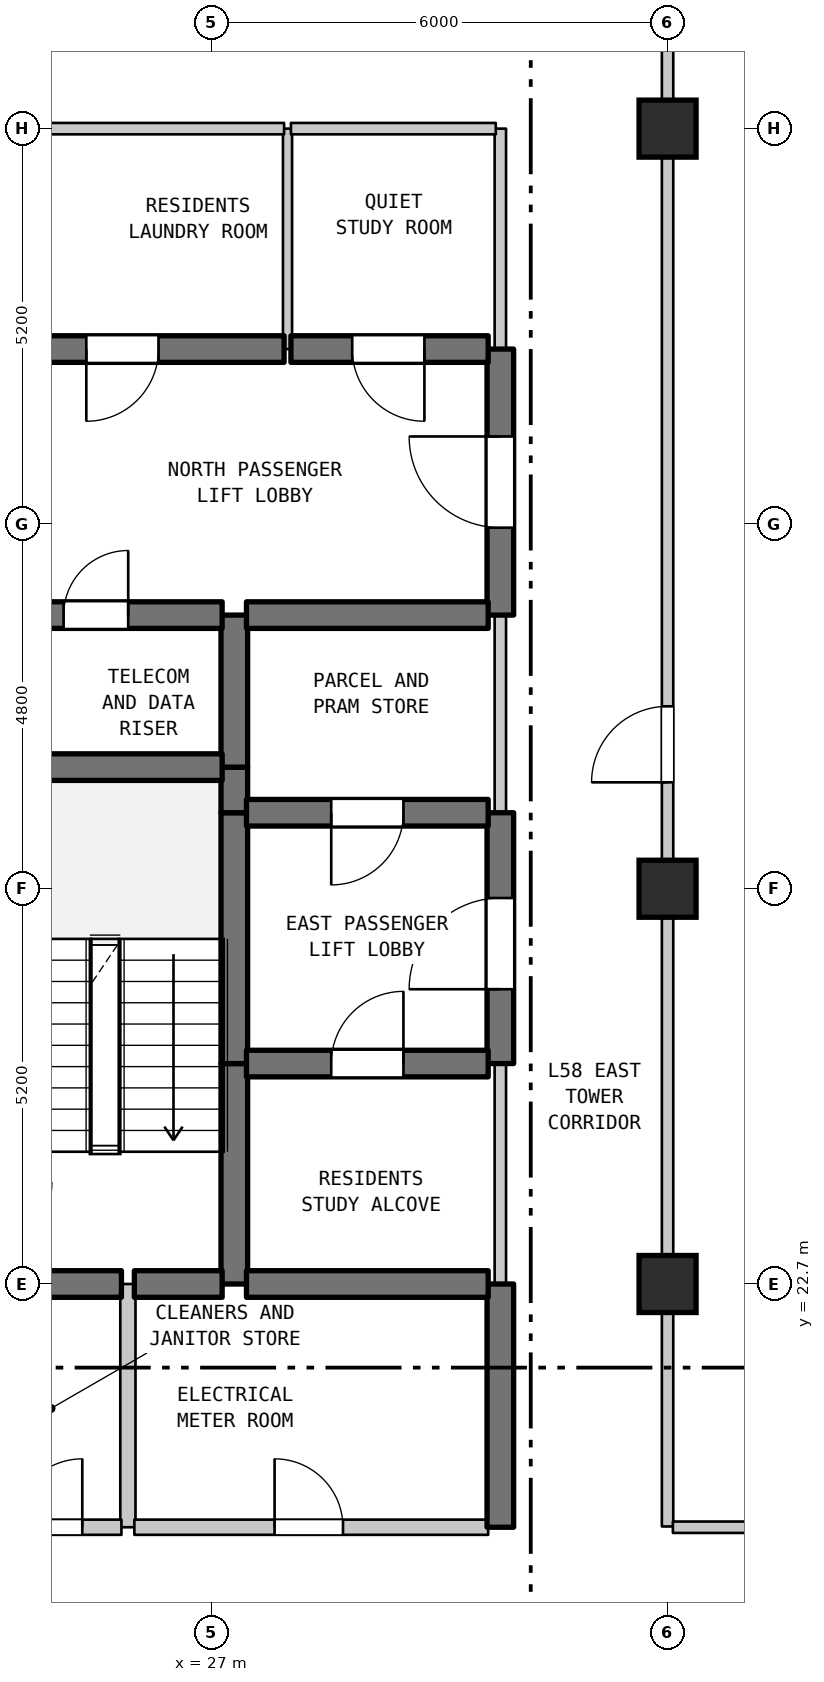
"""IFC4 building model, lengths in metres.
Left out: names, types, materials, properties, quantities, classifications, styles, units other than length and angle.
Written with IfcOpenShell. Run it as: python <this file> out.ifc"""

import sys

from ifc_helpers import new_model, si_unit, direction, frame, frame_2d, origin, origin_2d, place, context, subcontext, project, spatial, rectangle, extrude, element, fill, save


model = new_model("IFC4")
c1 = context("Model", 3, precision=1e-05, world=origin(), true_north=direction((0.0, 1.0)))
c2 = subcontext(c1, "Body", "Model", "MODEL_VIEW")
j1 = project(units=[si_unit("LENGTHUNIT", "METRE"), si_unit("PLANEANGLEUNIT", "RADIAN")], contexts=[c1])
p1 = place(None, origin())
s1 = spatial("IfcSite", under=j1, at=p1, CompositionType="ELEMENT")
p2 = place(p1, origin())
s2 = spatial("IfcBuilding", under=s1, at=p2, CompositionType="ELEMENT")
p3 = place(p2, frame((0.0, 0.0, 233.9)))
s3 = spatial("IfcBuildingStorey", under=s2, at=p3, CompositionType="ELEMENT", Elevation=233.9)
for number, where, z_axis, x_axis in (
    (1, (33.0, 22.7, 0.0), (0.0, 0.0, 1.0), (1.0, 0.0, 0.0)),
    (2, (33.0, 27.9, 0.0), (0.0, 0.0, 1.0), (1.0, 0.0, 0.0)),
    (3, (33.0, 37.9, 0.0), (0.0, 0.0, 1.0), (1.0, 0.0, 0.0)),
):
    element("IfcColumn", number, at=place(p3, frame(where, z_axis=z_axis, x_axis=x_axis)), inside=s3, PredefinedType="COLUMN", context=c2, shape_type="SweptSolid", body=[
        extrude(rectangle(XDim=0.75, YDim=0.75, at=origin_2d()), origin(), (0.0, 0.0, 1.0), 3.7),
    ])
p4 = place(p3, frame((25.9, 19.5, 0.0), z_axis=(0.0, 0.0, 1.0), x_axis=(0.0, 1.0, 0.0)))
e4 = element("IfcWall", 4, at=p4, inside=s3, PredefinedType="STANDARD", context=c2, shape_type="SweptSolid", body=[
    extrude(rectangle(XDim=3.2, YDim=0.2, at=frame_2d((1.6, 0.0))), origin(), (0.0, 0.0, 1.0), 3.28),
])
p5 = place(p3, frame((27.3, 22.7, 0.0), z_axis=(0.0, 0.0, 1.0), x_axis=(0.0, 1.0, 0.0)))
e5 = element("IfcWall", 5, at=p5, inside=s3, PredefinedType="SHEAR", context=c2, shape_type="SweptSolid", body=[
    extrude(rectangle(XDim=2.9, YDim=0.35, at=frame_2d((1.45, 0.0))), origin(), (0.0, 0.0, 1.0), 3.28),
])
p6 = place(p3, frame((27.3, 25.6, 0.0), z_axis=(0.0, 0.0, 1.0), x_axis=(0.0, 1.0, 0.0)))
e6 = element("IfcWall", 6, at=p6, inside=s3, PredefinedType="SHEAR", context=c2, shape_type="SweptSolid", body=[
    extrude(rectangle(XDim=3.3, YDim=0.35, at=frame_2d((1.65, 0.0))), origin(), (0.0, 0.0, 1.0), 3.28),
])
p7 = place(p3, frame((27.3, 28.9, 0.0), z_axis=(0.0, 0.0, 1.0), x_axis=(0.0, 1.0, 0.0)))
e7 = element("IfcWall", 7, at=p7, inside=s3, PredefinedType="SHEAR", context=c2, shape_type="SweptSolid", body=[
    extrude(rectangle(XDim=0.6, YDim=0.35, at=frame_2d((0.3, 0.0))), origin(), (0.0, 0.0, 1.0), 3.28),
])
p8 = place(p3, frame((27.3, 29.5, 0.0), z_axis=(0.0, 0.0, 1.0), x_axis=(0.0, 1.0, 0.0)))
e8 = element("IfcWall", 8, at=p8, inside=s3, PredefinedType="SHEAR", context=c2, shape_type="SweptSolid", body=[
    extrude(rectangle(XDim=2.0, YDim=0.35, at=frame_2d((1.0, 0.0))), origin(), (0.0, 0.0, 1.0), 3.28),
])
p9 = place(p3, frame((28.0, 35.0, 0.0), z_axis=(0.0, 0.0, 1.0), x_axis=(0.0, 1.0, 0.0)))
e9 = element("IfcWall", 9, at=p9, inside=s3, PredefinedType="PARTITIONING", context=c2, shape_type="SweptSolid", body=[
    extrude(rectangle(XDim=2.9, YDim=0.12, at=frame_2d((1.45, 0.0))), origin(), (0.0, 0.0, 1.0), 3.28),
])
p10 = place(p3, frame((30.8, 19.5, 0.0), z_axis=(0.0, 0.0, 1.0), x_axis=(0.0, 1.0, 0.0)))
e10 = element("IfcWall", 10, at=p10, inside=s3, PredefinedType="SHEAR", context=c2, shape_type="SweptSolid", body=[
    extrude(rectangle(XDim=3.2, YDim=0.35, at=frame_2d((1.6, 0.0))), origin(), (0.0, 0.0, 1.0), 3.28),
])
p11 = place(p3, frame((30.8, 22.7, 0.0), z_axis=(0.0, 0.0, 1.0), x_axis=(0.0, 1.0, 0.0)))
e11 = element("IfcWall", 11, at=p11, inside=s3, PredefinedType="STANDARD", context=c2, shape_type="SweptSolid", body=[
    extrude(rectangle(XDim=2.9, YDim=0.15, at=frame_2d((1.45, 0.0))), origin(), (0.0, 0.0, 1.0), 3.28),
])
p12 = place(p3, frame((30.8, 25.6, 0.0), z_axis=(0.0, 0.0, 1.0), x_axis=(0.0, 1.0, 0.0)))
e12 = element("IfcWall", 12, at=p12, inside=s3, PredefinedType="SHEAR", context=c2, shape_type="SweptSolid", body=[
    extrude(rectangle(XDim=3.3, YDim=0.35, at=frame_2d((1.65, 0.0))), origin(), (0.0, 0.0, 1.0), 3.28),
])
p13 = place(p12, frame((0.978, 0.0, 0.0)))
e13 = element("IfcOpeningElement", 13, at=p13, cuts=e12, PredefinedType="OPENING", context=c2, shape_type="SweptSolid", body=[
    extrude(rectangle(XDim=1.2, YDim=2.2, at=frame_2d((0.6, 1.1))), frame((0.0, 0.185, 0.0), z_axis=(0.0, -1.0, 0.0), x_axis=(1.0, 0.0, 0.0)), (0.0, 0.0, 1.0), 0.37),
])
p14 = place(p3, frame((30.8, 28.9, 0.0), z_axis=(0.0, 0.0, 1.0), x_axis=(0.0, 1.0, 0.0)))
e14 = element("IfcWall", 14, at=p14, inside=s3, PredefinedType="STANDARD", context=c2, shape_type="SweptSolid", body=[
    extrude(rectangle(XDim=2.6, YDim=0.15, at=frame_2d((1.3, 0.0))), origin(), (0.0, 0.0, 1.0), 3.28),
])
p15 = place(p3, frame((30.8, 31.5, 0.0), z_axis=(0.0, 0.0, 1.0), x_axis=(0.0, 1.0, 0.0)))
e15 = element("IfcWall", 15, at=p15, inside=s3, PredefinedType="SHEAR", context=c2, shape_type="SweptSolid", body=[
    extrude(rectangle(XDim=3.5, YDim=0.35, at=frame_2d((1.75, 0.0))), origin(), (0.0, 0.0, 1.0), 3.28),
])
p16 = place(p15, frame((1.15, 0.0, 0.0)))
e16 = element("IfcOpeningElement", 16, at=p16, cuts=e15, PredefinedType="OPENING", context=c2, shape_type="SweptSolid", body=[
    extrude(rectangle(XDim=1.2, YDim=2.2, at=frame_2d((0.6, 1.1))), frame((0.0, 0.185, 0.0), z_axis=(0.0, -1.0, 0.0), x_axis=(1.0, 0.0, 0.0)), (0.0, 0.0, 1.0), 0.37),
])
p17 = place(p3, frame((30.8, 35.0, 0.0), z_axis=(0.0, 0.0, 1.0), x_axis=(0.0, 1.0, 0.0)))
e17 = element("IfcWall", 17, at=p17, inside=s3, PredefinedType="STANDARD", context=c2, shape_type="SweptSolid", body=[
    extrude(rectangle(XDim=2.9, YDim=0.15, at=frame_2d((1.45, 0.0))), origin(), (0.0, 0.0, 1.0), 3.28),
])
p18 = place(p3, frame((33.0, 19.51, 0.0), z_axis=(0.0, 0.0, 1.0), x_axis=(0.0, 1.0, 0.0)))
e18 = element("IfcWall", 18, at=p18, inside=s3, PredefinedType="STANDARD", context=c2, shape_type="SweptSolid", body=[
    extrude(rectangle(XDim=18.39, YDim=0.15, at=frame_2d((9.195, 0.0))), origin(), (0.0, 0.0, 1.0), 2.78),
])
p19 = place(p18, frame((9.79, 0.0, 0.0)))
e19 = element("IfcOpeningElement", 19, at=p19, cuts=e18, PredefinedType="OPENING", context=c2, shape_type="SweptSolid", body=[
    extrude(rectangle(XDim=1.0, YDim=2.15, at=frame_2d((0.5, 1.075))), frame((0.0, 0.085, 0.0), z_axis=(0.0, -1.0, 0.0), x_axis=(1.0, 0.0, 0.0)), (0.0, 0.0, 1.0), 0.17),
])
p20 = place(p3, frame((23.96, 19.5, 0.0), z_axis=(0.0, 0.0, 1.0), x_axis=(1.0, 0.0, 0.0)))
e20 = element("IfcWall", 20, at=p20, inside=s3, PredefinedType="STANDARD", context=c2, shape_type="SweptSolid", body=[
    extrude(rectangle(XDim=1.855, YDim=0.2, at=frame_2d((0.927, 0.0))), origin(), (0.0, 0.0, 1.0), 3.28),
])
p21 = place(p20, frame((0.44, 0.0, 0.0)))
e21 = element("IfcOpeningElement", 21, at=p21, cuts=e20, PredefinedType="OPENING", context=c2, shape_type="SweptSolid", body=[
    extrude(rectangle(XDim=0.9, YDim=2.15, at=frame_2d((0.45, 1.075))), frame((0.0, 0.11, 0.0), z_axis=(0.0, -1.0, 0.0), x_axis=(1.0, 0.0, 0.0)), (0.0, 0.0, 1.0), 0.22),
])
p22 = place(p3, frame((25.985, 19.5, 0.0), z_axis=(0.0, 0.0, 1.0), x_axis=(1.0, 0.0, 0.0)))
e22 = element("IfcWall", 22, at=p22, inside=s3, PredefinedType="STANDARD", context=c2, shape_type="SweptSolid", body=[
    extrude(rectangle(XDim=4.655, YDim=0.2, at=frame_2d((2.327, 0.0))), origin(), (0.0, 0.0, 1.0), 3.28),
])
p23 = place(p22, frame((1.845, 0.0, 0.0)))
e23 = element("IfcOpeningElement", 23, at=p23, cuts=e22, PredefinedType="OPENING", context=c2, shape_type="SweptSolid", body=[
    extrude(rectangle(XDim=0.9, YDim=2.15, at=frame_2d((0.45, 1.075))), frame((0.0, 0.11, 0.0), z_axis=(0.0, -1.0, 0.0), x_axis=(1.0, 0.0, 0.0)), (0.0, 0.0, 1.0), 0.22),
])
p24 = place(p3, frame((33.07, 19.5, 0.0), z_axis=(0.0, 0.0, 1.0), x_axis=(1.0, 0.0, 0.0)))
e24 = element("IfcWall", 24, at=p24, inside=s3, PredefinedType="STANDARD", context=c2, shape_type="SweptSolid", body=[
    extrude(rectangle(XDim=18.87, YDim=0.15, at=frame_2d((9.435, 0.0))), origin(), (0.0, 0.0, 1.0), 3.28),
])
p25 = place(p24, frame((8.935, 0.0, 0.0)))
e25 = element("IfcOpeningElement", 25, at=p25, cuts=e24, PredefinedType="OPENING", context=c2, shape_type="SweptSolid", body=[
    extrude(rectangle(XDim=1.0, YDim=2.15, at=frame_2d((0.5, 1.075))), frame((0.0, 0.085, 0.0), z_axis=(0.0, -1.0, 0.0), x_axis=(1.0, 0.0, 0.0)), (0.0, 0.0, 1.0), 0.17),
])
p26 = place(p3, frame((23.96, 22.7, 0.0), z_axis=(0.0, 0.0, 1.0), x_axis=(1.0, 0.0, 0.0)))
e26 = element("IfcWall", 26, at=p26, inside=s3, PredefinedType="SHEAR", context=c2, shape_type="SweptSolid", body=[
    extrude(rectangle(XDim=1.855, YDim=0.35, at=frame_2d((0.927, 0.0))), origin(), (0.0, 0.0, 1.0), 3.28),
])
p27 = place(p3, frame((25.985, 22.7, 0.0), z_axis=(0.0, 0.0, 1.0), x_axis=(1.0, 0.0, 0.0)))
e27 = element("IfcWall", 27, at=p27, inside=s3, PredefinedType="SHEAR", context=c2, shape_type="SweptSolid", body=[
    extrude(rectangle(XDim=1.155, YDim=0.35, at=frame_2d((0.577, 0.0))), origin(), (0.0, 0.0, 1.0), 3.28),
])
p28 = place(p3, frame((27.46, 22.7, 0.0), z_axis=(0.0, 0.0, 1.0), x_axis=(1.0, 0.0, 0.0)))
e28 = element("IfcWall", 28, at=p28, inside=s3, PredefinedType="SHEAR", context=c2, shape_type="SweptSolid", body=[
    extrude(rectangle(XDim=3.18, YDim=0.35, at=frame_2d((1.59, 0.0))), origin(), (0.0, 0.0, 1.0), 3.28),
])
p29 = place(p3, frame((27.46, 25.6, 0.0), z_axis=(0.0, 0.0, 1.0), x_axis=(1.0, 0.0, 0.0)))
e29 = element("IfcWall", 29, at=p29, inside=s3, PredefinedType="SHEAR", context=c2, shape_type="SweptSolid", body=[
    extrude(rectangle(XDim=3.18, YDim=0.35, at=frame_2d((1.59, 0.0))), origin(), (0.0, 0.0, 1.0), 3.28),
])
p30 = place(p29, frame((1.115, 0.0, 0.0)))
e30 = element("IfcOpeningElement", 30, at=p30, cuts=e29, PredefinedType="OPENING", context=c2, shape_type="SweptSolid", body=[
    extrude(rectangle(XDim=0.95, YDim=2.15, at=frame_2d((0.475, 1.075))), frame((0.0, 0.185, 0.0), z_axis=(0.0, -1.0, 0.0), x_axis=(1.0, 0.0, 0.0)), (0.0, 0.0, 1.0), 0.37),
])
p31 = place(p3, frame((27.46, 28.9, 0.0), z_axis=(0.0, 0.0, 1.0), x_axis=(1.0, 0.0, 0.0)))
e31 = element("IfcWall", 31, at=p31, inside=s3, PredefinedType="SHEAR", context=c2, shape_type="SweptSolid", body=[
    extrude(rectangle(XDim=3.18, YDim=0.35, at=frame_2d((1.59, 0.0))), origin(), (0.0, 0.0, 1.0), 3.28),
])
p32 = place(p31, frame((1.115, 0.0, 0.0)))
e32 = element("IfcOpeningElement", 32, at=p32, cuts=e31, PredefinedType="OPENING", context=c2, shape_type="SweptSolid", body=[
    extrude(rectangle(XDim=0.95, YDim=2.15, at=frame_2d((0.475, 1.075))), frame((0.0, 0.185, 0.0), z_axis=(0.0, -1.0, 0.0), x_axis=(1.0, 0.0, 0.0)), (0.0, 0.0, 1.0), 0.37),
])
p33 = place(p3, frame((23.96, 29.5, 0.0), z_axis=(0.0, 0.0, 1.0), x_axis=(1.0, 0.0, 0.0)))
e33 = element("IfcWall", 33, at=p33, inside=s3, PredefinedType="SHEAR", context=c2, shape_type="SweptSolid", body=[
    extrude(rectangle(XDim=3.18, YDim=0.35, at=frame_2d((1.59, 0.0))), origin(), (0.0, 0.0, 1.0), 3.28),
])
p34 = place(p3, frame((23.96, 31.5, 0.0), z_axis=(0.0, 0.0, 1.0), x_axis=(1.0, 0.0, 0.0)))
e34 = element("IfcWall", 34, at=p34, inside=s3, PredefinedType="SHEAR", context=c2, shape_type="SweptSolid", body=[
    extrude(rectangle(XDim=3.18, YDim=0.35, at=frame_2d((1.59, 0.0))), origin(), (0.0, 0.0, 1.0), 3.28),
])
p35 = place(p34, frame((1.094, 0.0, 0.0)))
e35 = element("IfcOpeningElement", 35, at=p35, cuts=e34, PredefinedType="OPENING", context=c2, shape_type="SweptSolid", body=[
    extrude(rectangle(XDim=0.85, YDim=2.1, at=frame_2d((0.425, 1.05))), frame((0.0, 0.185, 0.0), z_axis=(0.0, -1.0, 0.0), x_axis=(1.0, 0.0, 0.0)), (0.0, 0.0, 1.0), 0.37),
])
p36 = place(p3, frame((27.46, 31.5, 0.0), z_axis=(0.0, 0.0, 1.0), x_axis=(1.0, 0.0, 0.0)))
e36 = element("IfcWall", 36, at=p36, inside=s3, PredefinedType="SHEAR", context=c2, shape_type="SweptSolid", body=[
    extrude(rectangle(XDim=3.18, YDim=0.35, at=frame_2d((1.59, 0.0))), origin(), (0.0, 0.0, 1.0), 3.28),
])
p37 = place(p3, frame((23.96, 35.0, 0.0), z_axis=(0.0, 0.0, 1.0), x_axis=(1.0, 0.0, 0.0)))
e37 = element("IfcWall", 37, at=p37, inside=s3, PredefinedType="SHEAR", context=c2, shape_type="SweptSolid", body=[
    extrude(rectangle(XDim=3.995, YDim=0.35, at=frame_2d((1.998, 0.0))), origin(), (0.0, 0.0, 1.0), 3.28),
])
p38 = place(p37, frame((1.393, 0.0, 0.0)))
e38 = element("IfcOpeningElement", 38, at=p38, cuts=e37, PredefinedType="OPENING", context=c2, shape_type="SweptSolid", body=[
    extrude(rectangle(XDim=0.95, YDim=2.15, at=frame_2d((0.475, 1.075))), frame((0.0, 0.185, 0.0), z_axis=(0.0, -1.0, 0.0), x_axis=(1.0, 0.0, 0.0)), (0.0, 0.0, 1.0), 0.37),
])
p39 = place(p3, frame((28.045, 35.0, 0.0), z_axis=(0.0, 0.0, 1.0), x_axis=(1.0, 0.0, 0.0)))
e39 = element("IfcWall", 39, at=p39, inside=s3, PredefinedType="SHEAR", context=c2, shape_type="SweptSolid", body=[
    extrude(rectangle(XDim=2.595, YDim=0.35, at=frame_2d((1.297, 0.0))), origin(), (0.0, 0.0, 1.0), 3.28),
])
p40 = place(p39, frame((0.806, 0.0, 0.0)))
e40 = element("IfcOpeningElement", 40, at=p40, cuts=e39, PredefinedType="OPENING", context=c2, shape_type="SweptSolid", body=[
    extrude(rectangle(XDim=0.95, YDim=2.15, at=frame_2d((0.475, 1.075))), frame((0.0, 0.185, 0.0), z_axis=(0.0, -1.0, 0.0), x_axis=(1.0, 0.0, 0.0)), (0.0, 0.0, 1.0), 0.37),
])
p41 = place(p3, frame((23.96, 37.9, 0.0), z_axis=(0.0, 0.0, 1.0), x_axis=(1.0, 0.0, 0.0)))
e41 = element("IfcWall", 41, at=p41, inside=s3, PredefinedType="STANDARD", context=c2, shape_type="SweptSolid", body=[
    extrude(rectangle(XDim=3.995, YDim=0.15, at=frame_2d((1.998, 0.0))), origin(), (0.0, 0.0, 1.0), 2.68),
])
p42 = place(p3, frame((28.045, 37.9, 0.0), z_axis=(0.0, 0.0, 1.0), x_axis=(1.0, 0.0, 0.0)))
e42 = element("IfcWall", 42, at=p42, inside=s3, PredefinedType="STANDARD", context=c2, shape_type="SweptSolid", body=[
    extrude(rectangle(XDim=2.695, YDim=0.15, at=frame_2d((1.348, 0.0))), origin(), (0.0, 0.0, 1.0), 2.68),
])
p43 = place(p3, frame((33.0, 37.9, 0.0), z_axis=(0.0, 0.0, 1.0), x_axis=(0.0, 1.0, 0.0)))
e43 = element("IfcWall", 43, at=p43, inside=s3, PredefinedType="STANDARD", context=c2, shape_type="SweptSolid", body=[
    extrude(rectangle(XDim=2.19, YDim=0.15, at=frame_2d((1.095, 0.0))), origin(), (0.0, 0.0, 1.0), 2.68),
])
p44 = place(p13, origin())
e44 = element("IfcDoor", 44, at=p44, inside=s3, OperationType="SINGLE_SWING_LEFT", PredefinedType="DOOR", context=c2, shape_type="SweptSolid", body=[
    extrude(rectangle(XDim=1.2, YDim=2.2, at=frame_2d((0.6, 1.1))), frame((0.0, 0.025, 0.0), z_axis=(0.0, -1.0, 0.0), x_axis=(1.0, 0.0, 0.0)), (0.0, 0.0, 1.0), 0.05),
])
fill(e13, e44)
p45 = place(p16, origin())
e45 = element("IfcDoor", 45, at=p45, inside=s3, OperationType="SINGLE_SWING_RIGHT", PredefinedType="DOOR", context=c2, shape_type="SweptSolid", body=[
    extrude(rectangle(XDim=1.2, YDim=2.2, at=frame_2d((0.6, 1.1))), frame((0.0, 0.025, 0.0), z_axis=(0.0, -1.0, 0.0), x_axis=(1.0, 0.0, 0.0)), (0.0, 0.0, 1.0), 0.05),
])
fill(e16, e45)
p46 = place(p19, origin())
e46 = element("IfcDoor", 46, at=p46, inside=s3, OperationType="SINGLE_SWING_LEFT", PredefinedType="DOOR", context=c2, shape_type="SweptSolid", body=[
    extrude(rectangle(XDim=1.0, YDim=2.15, at=frame_2d((0.5, 1.075))), frame((0.0, 0.025, 0.0), z_axis=(0.0, -1.0, 0.0), x_axis=(1.0, 0.0, 0.0)), (0.0, 0.0, 1.0), 0.05),
])
fill(e19, e46)
p47 = place(p21, origin())
e47 = element("IfcDoor", 47, at=p47, inside=s3, OperationType="SINGLE_SWING_RIGHT", PredefinedType="DOOR", context=c2, shape_type="SweptSolid", body=[
    extrude(rectangle(XDim=0.9, YDim=2.15, at=frame_2d((0.45, 1.075))), frame((0.0, 0.025, 0.0), z_axis=(0.0, -1.0, 0.0), x_axis=(1.0, 0.0, 0.0)), (0.0, 0.0, 1.0), 0.05),
])
fill(e21, e47)
p48 = place(p23, origin())
e48 = element("IfcDoor", 48, at=p48, inside=s3, OperationType="SINGLE_SWING_LEFT", PredefinedType="DOOR", context=c2, shape_type="SweptSolid", body=[
    extrude(rectangle(XDim=0.9, YDim=2.15, at=frame_2d((0.45, 1.075))), frame((0.0, 0.025, 0.0), z_axis=(0.0, -1.0, 0.0), x_axis=(1.0, 0.0, 0.0)), (0.0, 0.0, 1.0), 0.05),
])
fill(e23, e48)
p49 = place(p30, origin())
e49 = element("IfcDoor", 49, at=p49, inside=s3, OperationType="SINGLE_SWING_RIGHT", PredefinedType="DOOR", context=c2, shape_type="SweptSolid", body=[
    extrude(rectangle(XDim=0.95, YDim=2.15, at=frame_2d((0.475, 1.075))), frame((0.0, 0.025, 0.0), z_axis=(0.0, -1.0, 0.0), x_axis=(1.0, 0.0, 0.0)), (0.0, 0.0, 1.0), 0.05),
])
fill(e30, e49)
p50 = place(p32, frame((0.95, 0.0, 0.0), z_axis=(0.0, 0.0, 1.0), x_axis=(-1.0, 0.0, 0.0)))
e50 = element("IfcDoor", 50, at=p50, inside=s3, OperationType="SINGLE_SWING_LEFT", PredefinedType="DOOR", context=c2, shape_type="SweptSolid", body=[
    extrude(rectangle(XDim=0.95, YDim=2.15, at=frame_2d((0.475, 1.075))), frame((0.0, 0.025, 0.0), z_axis=(0.0, -1.0, 0.0), x_axis=(1.0, 0.0, 0.0)), (0.0, 0.0, 1.0), 0.05),
])
fill(e32, e50)
p51 = place(p35, origin())
e51 = element("IfcDoor", 51, at=p51, inside=s3, OperationType="SINGLE_SWING_RIGHT", PredefinedType="DOOR", context=c2, shape_type="SweptSolid", body=[
    extrude(rectangle(XDim=0.85, YDim=2.1, at=frame_2d((0.425, 1.05))), frame((0.0, 0.025, 0.0), z_axis=(0.0, -1.0, 0.0), x_axis=(1.0, 0.0, 0.0)), (0.0, 0.0, 1.0), 0.05),
])
fill(e35, e51)
p52 = place(p38, frame((0.95, 0.0, 0.0), z_axis=(0.0, 0.0, 1.0), x_axis=(-1.0, 0.0, 0.0)))
e52 = element("IfcDoor", 52, at=p52, inside=s3, OperationType="SINGLE_SWING_LEFT", PredefinedType="DOOR", context=c2, shape_type="SweptSolid", body=[
    extrude(rectangle(XDim=0.95, YDim=2.15, at=frame_2d((0.475, 1.075))), frame((0.0, 0.025, 0.0), z_axis=(0.0, -1.0, 0.0), x_axis=(1.0, 0.0, 0.0)), (0.0, 0.0, 1.0), 0.05),
])
fill(e38, e52)
p53 = place(p40, frame((0.95, 0.0, 0.0), z_axis=(0.0, 0.0, 1.0), x_axis=(-1.0, 0.0, 0.0)))
e53 = element("IfcDoor", 53, at=p53, inside=s3, OperationType="SINGLE_SWING_RIGHT", PredefinedType="DOOR", context=c2, shape_type="SweptSolid", body=[
    extrude(rectangle(XDim=0.95, YDim=2.15, at=frame_2d((0.475, 1.075))), frame((0.0, 0.025, 0.0), z_axis=(0.0, -1.0, 0.0), x_axis=(1.0, 0.0, 0.0)), (0.0, 0.0, 1.0), 0.05),
])
fill(e40, e53)
save(model, sys.argv[1])
